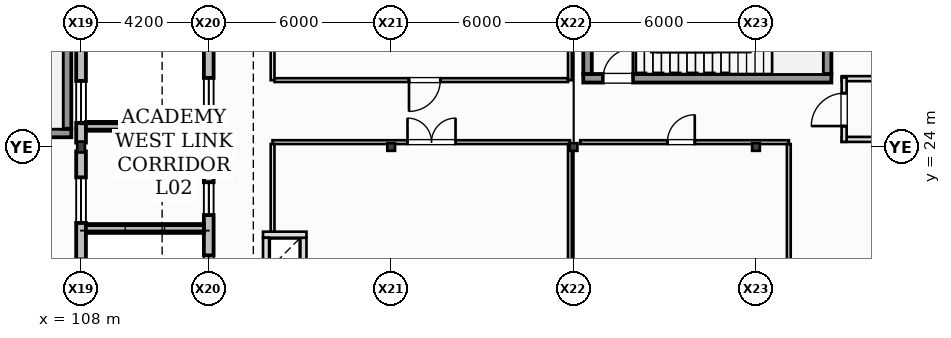
"""IFC4 building model, lengths in metres.
Left out: names, types, materials, properties, quantities, classifications, styles, units other than length and angle.
Written with IfcOpenShell. Run it as: python <this file> out.ifc"""

import sys

from ifc_helpers import new_model, si_unit, direction, frame, frame_2d, origin, origin_2d, place, context, subcontext, project, spatial, rectangle, hollow_rectangle, i_section, extrude, element, fill, save


model = new_model("IFC4")
c1 = context("Model", 3, precision=1e-05, world=origin(), true_north=direction((0.0, 1.0)))
c2 = subcontext(c1, "Body", "Model", "MODEL_VIEW")
j1 = project(units=[si_unit("LENGTHUNIT", "METRE"), si_unit("PLANEANGLEUNIT", "RADIAN")], contexts=[c1])
p1 = place(None, origin())
s1 = spatial("IfcSite", under=j1, at=p1, CompositionType="ELEMENT")
p2 = place(p1, origin())
s2 = spatial("IfcBuilding", under=s1, at=p2, CompositionType="ELEMENT")
p3 = place(p2, frame((0.0, 0.0, 6.0)))
s3 = spatial("IfcBuildingStorey", under=s2, at=p3, CompositionType="ELEMENT", Elevation=6.0)
p4 = place(p3, frame((108.0, 24.0, 0.0), z_axis=(0.0, 0.0, 1.0), x_axis=(1.0, 0.0, 0.0)))
e1 = element("IfcColumn", 1, at=p4, inside=s3, PredefinedType="COLUMN", context=c2, shape_type="SweptSolid", body=[
    extrude(i_section(OverallWidth=0.254, OverallDepth=0.353, WebThickness=0.01, FlangeThickness=0.016, at=origin_2d()), origin(), (0.0, 0.0, 1.0), 4.0),
])
p5 = place(p3, frame((112.2, 24.0, 0.0), z_axis=(0.0, 0.0, 1.0), x_axis=(1.0, 0.0, 0.0)))
e2 = element("IfcColumn", 2, at=p5, inside=s3, PredefinedType="COLUMN", context=c2, shape_type="SweptSolid", body=[
    extrude(hollow_rectangle(XDim=0.25, YDim=0.25, WallThickness=0.012, at=origin_2d()), origin(), (0.0, 0.0, 1.0), 4.0),
])
for number, where, z_axis, x_axis in (
    (3, (118.2, 24.0, 0.0), (0.0, 0.0, 1.0), (1.0, 0.0, 0.0)),
    (4, (124.2, 24.0, 0.0), (0.0, 0.0, 1.0), (1.0, 0.0, 0.0)),
    (5, (130.2, 24.0, 0.0), (0.0, 0.0, 1.0), (1.0, 0.0, 0.0)),
):
    element("IfcColumn", number, at=place(p3, frame(where, z_axis=z_axis, x_axis=x_axis)), inside=s3, PredefinedType="COLUMN", context=c2, shape_type="SweptSolid", body=[
        extrude(i_section(OverallWidth=0.254, OverallDepth=0.253, WebThickness=0.009, FlangeThickness=0.014, at=origin_2d()), origin(), (0.0, 0.0, 1.0), 4.0),
    ])
p6 = place(p3, frame((108.0, 18.145, 0.0), z_axis=(0.0, 0.0, 1.0), x_axis=(0.0, 1.0, 0.0)))
e6 = element("IfcWall", 6, at=p6, inside=s3, PredefinedType="STANDARD", context=c2, shape_type="SweptSolid", body=[
    extrude(rectangle(XDim=5.71, YDim=0.32, at=frame_2d((2.855, 0.0))), origin(), (0.0, 0.0, 1.0), 4.0),
])
p7 = place(p6, frame((0.897, 0.0, 0.86)))
e7 = element("IfcOpeningElement", 7, at=p7, cuts=e6, PredefinedType="OPENING", context=c2, shape_type="SweptSolid", body=[
    extrude(rectangle(XDim=1.26, YDim=1.26, at=frame_2d((0.63, 0.63))), frame((0.0, 0.17, 0.0), z_axis=(0.0, -1.0, 0.0), x_axis=(1.0, 0.0, 0.0)), (0.0, 0.0, 1.0), 0.34),
])
p8 = place(p6, frame((3.357, 0.0, 1.42)))
e8 = element("IfcOpeningElement", 8, at=p8, cuts=e6, PredefinedType="OPENING", context=c2, shape_type="SweptSolid", body=[
    extrude(rectangle(XDim=1.5, YDim=1.5, at=frame_2d((0.75, 0.75))), frame((0.0, 0.17, 0.0), z_axis=(0.0, -1.0, 0.0), x_axis=(1.0, 0.0, 0.0)), (0.0, 0.0, 1.0), 0.34),
])
p9 = place(p3, frame((108.0, 24.145, 0.0), z_axis=(0.0, 0.0, 1.0), x_axis=(0.0, 1.0, 0.0)))
e9 = element("IfcWall", 9, at=p9, inside=s3, PredefinedType="STANDARD", context=c2, shape_type="SweptSolid", body=[
    extrude(rectangle(XDim=5.71, YDim=0.32, at=frame_2d((2.855, 0.0))), origin(), (0.0, 0.0, 1.0), 3.157),
])
p10 = place(p9, frame((0.649, 0.0, 1.18)))
e10 = element("IfcOpeningElement", 10, at=p10, cuts=e9, PredefinedType="OPENING", context=c2, shape_type="SweptSolid", body=[
    extrude(rectangle(XDim=1.38, YDim=1.38, at=frame_2d((0.69, 0.69))), frame((0.0, 0.17, 0.0), z_axis=(0.0, -1.0, 0.0), x_axis=(1.0, 0.0, 0.0)), (0.0, 0.0, 1.0), 0.34),
])
p11 = place(p9, frame((3.933, 0.0, 0.96)))
e11 = element("IfcOpeningElement", 11, at=p11, cuts=e9, PredefinedType="OPENING", context=c2, shape_type="SweptSolid", body=[
    extrude(rectangle(XDim=0.9, YDim=0.9, at=frame_2d((0.45, 0.45))), frame((0.0, 0.17, 0.0), z_axis=(0.0, -1.0, 0.0), x_axis=(1.0, 0.0, 0.0)), (0.0, 0.0, 1.0), 0.34),
])
p12 = place(p3, frame((112.2, 23.855, 0.0), z_axis=(0.0, 0.0, 1.0), x_axis=(0.0, -1.0, 0.0)))
e12 = element("IfcWall", 12, at=p12, inside=s3, PredefinedType="STANDARD", context=c2, shape_type="SweptSolid", body=[
    extrude(rectangle(XDim=5.71, YDim=0.32, at=frame_2d((2.855, 0.0))), origin(), (0.0, 0.0, 1.0), 3.3),
])
p13 = place(p12, frame((1.014, 0.0, 1.28)))
e13 = element("IfcOpeningElement", 13, at=p13, cuts=e12, PredefinedType="OPENING", context=c2, shape_type="SweptSolid", body=[
    extrude(rectangle(XDim=1.08, YDim=1.08, at=frame_2d((0.54, 0.54))), frame((0.0, 0.17, 0.0), z_axis=(0.0, -1.0, 0.0), x_axis=(1.0, 0.0, 0.0)), (0.0, 0.0, 1.0), 0.34),
])
p14 = place(p12, frame((3.42, 0.0, 1.18)))
e14 = element("IfcOpeningElement", 14, at=p14, cuts=e12, PredefinedType="OPENING", context=c2, shape_type="SweptSolid", body=[
    extrude(rectangle(XDim=1.32, YDim=1.32, at=frame_2d((0.66, 0.66))), frame((0.0, 0.17, 0.0), z_axis=(0.0, -1.0, 0.0), x_axis=(1.0, 0.0, 0.0)), (0.0, 0.0, 1.0), 0.34),
])
p15 = place(p3, frame((112.2, 29.855, 0.0), z_axis=(0.0, 0.0, 1.0), x_axis=(0.0, -1.0, 0.0)))
e15 = element("IfcWall", 15, at=p15, inside=s3, PredefinedType="STANDARD", context=c2, shape_type="SweptSolid", body=[
    extrude(rectangle(XDim=5.71, YDim=0.32, at=frame_2d((2.855, 0.0))), origin(), (0.0, 0.0, 1.0), 3.3),
])
p16 = place(p15, frame((0.712, 0.0, 0.86)))
e16 = element("IfcOpeningElement", 16, at=p16, cuts=e15, PredefinedType="OPENING", context=c2, shape_type="SweptSolid", body=[
    extrude(rectangle(XDim=1.2, YDim=1.2, at=frame_2d((0.6, 0.6))), frame((0.0, 0.17, 0.0), z_axis=(0.0, -1.0, 0.0), x_axis=(1.0, 0.0, 0.0)), (0.0, 0.0, 1.0), 0.34),
])
p17 = place(p15, frame((3.582, 0.0, 1.42)))
e17 = element("IfcOpeningElement", 17, at=p17, cuts=e15, PredefinedType="OPENING", context=c2, shape_type="SweptSolid", body=[
    extrude(rectangle(XDim=1.44, YDim=1.44, at=frame_2d((0.72, 0.72))), frame((0.0, 0.17, 0.0), z_axis=(0.0, -1.0, 0.0), x_axis=(1.0, 0.0, 0.0)), (0.0, 0.0, 1.0), 0.34),
])
p18 = place(p3, frame((108.16, 21.32, 0.0), z_axis=(0.0, 0.0, 1.0), x_axis=(1.0, 0.0, 0.0)))
e18 = element("IfcWall", 18, at=p18, inside=s3, PredefinedType="STANDARD", context=c2, shape_type="SweptSolid", body=[
    extrude(rectangle(XDim=3.88, YDim=0.29, at=frame_2d((1.94, 0.0))), origin(), (0.0, 0.0, 1.0), 0.44),
])
p19 = place(p3, frame((112.04, 24.68, 0.0), z_axis=(0.0, 0.0, 1.0), x_axis=(-1.0, 0.0, 0.0)))
e19 = element("IfcWall", 19, at=p19, inside=s3, PredefinedType="STANDARD", context=c2, shape_type="SweptSolid", body=[
    extrude(rectangle(XDim=3.88, YDim=0.29, at=frame_2d((1.94, 0.0))), origin(), (0.0, 0.0, 1.0), 0.56),
])
p20 = place(p3, frame((99.52, 24.46, 0.0), z_axis=(0.0, 0.0, 1.0), x_axis=(1.0, 0.0, 0.0)))
e20 = element("IfcWall", 20, at=p20, inside=s3, PredefinedType="SHEAR", context=c2, shape_type="SweptSolid", body=[
    extrude(rectangle(XDim=8.16, YDim=0.28, at=frame_2d((4.08, 0.0))), origin(), (0.0, 0.0, 1.0), 4.0),
])
p21 = place(p3, frame((107.54, 24.6, 0.0), z_axis=(0.0, 0.0, 1.0), x_axis=(0.0, 1.0, 0.0)))
e21 = element("IfcWall", 21, at=p21, inside=s3, PredefinedType="SHEAR", context=c2, shape_type="SweptSolid", body=[
    extrude(rectangle(XDim=3.0, YDim=0.28, at=frame_2d((1.5, 0.0))), origin(), (0.0, 0.0, 1.0), 4.0),
])
p22 = place(p3, frame((124.52, 26.26, 0.0), z_axis=(0.0, 0.0, 1.0), x_axis=(1.0, 0.0, 0.0)))
e22 = element("IfcWall", 22, at=p22, inside=s3, PredefinedType="SHEAR", context=c2, shape_type="SweptSolid", body=[
    extrude(rectangle(XDim=8.16, YDim=0.28, at=frame_2d((4.08, 0.0))), origin(), (0.0, 0.0, 1.0), 4.0),
])
p23 = place(p22, frame((0.65, 0.0, 0.0)))
e23 = element("IfcOpeningElement", 23, at=p23, cuts=e22, PredefinedType="OPENING", context=c2, shape_type="SweptSolid", body=[
    extrude(rectangle(XDim=0.98, YDim=2.15, at=frame_2d((0.49, 1.075))), frame((0.0, 0.15, 0.0), z_axis=(0.0, -1.0, 0.0), x_axis=(1.0, 0.0, 0.0)), (0.0, 0.0, 1.0), 0.3),
])
for number, where, z_axis, x_axis in (
    (24, (124.66, 29.4, 0.0), (0.0, 0.0, 1.0), (0.0, -1.0, 0.0)),
    (25, (132.54, 26.4, 0.0), (0.0, 0.0, 1.0), (0.0, 1.0, 0.0)),
):
    element("IfcWall", number, at=place(p3, frame(where, z_axis=z_axis, x_axis=x_axis)), inside=s3, PredefinedType="SHEAR", context=c2, shape_type="SweptSolid", body=[
        extrude(rectangle(XDim=3.0, YDim=0.28, at=frame_2d((1.5, 0.0))), origin(), (0.0, 0.0, 1.0), 4.0),
    ])
p24 = place(p3, frame((133.02, 24.25, 0.0), z_axis=(0.0, 0.0, 1.0), x_axis=(1.0, 0.0, 0.0)))
e26 = element("IfcWall", 26, at=p24, inside=s3, PredefinedType="PARTITIONING", context=c2, shape_type="SweptSolid", body=[
    extrude(rectangle(XDim=5.16, YDim=0.165, at=frame_2d((2.58, 0.0))), origin(), (0.0, 0.0, 1.0), 3.153),
])
p25 = place(p24, frame((1.087, 0.0, 0.0)))
e27 = element("IfcOpeningElement", 27, at=p25, cuts=e26, PredefinedType="OPENING", context=c2, shape_type="SweptSolid", body=[
    extrude(rectangle(XDim=1.13, YDim=2.18, at=frame_2d((0.565, 1.09))), frame((0.0, 0.093, 0.0), z_axis=(0.0, -1.0, 0.0), x_axis=(1.0, 0.0, 0.0)), (0.0, 0.0, 1.0), 0.185),
])
p26 = place(p3, frame((133.02, 26.248, 0.0), z_axis=(0.0, 0.0, 1.0), x_axis=(1.0, 0.0, 0.0)))
e28 = element("IfcWall", 28, at=p26, inside=s3, PredefinedType="PARTITIONING", context=c2, shape_type="SweptSolid", body=[
    extrude(rectangle(XDim=1.115, YDim=0.165, at=frame_2d((0.558, 0.0))), origin(), (0.0, 0.0, 1.0), 3.72),
])
p27 = place(p3, frame((133.1, 24.17, 0.0), z_axis=(0.0, 0.0, 1.0), x_axis=(0.0, 1.0, 0.0)))
e29 = element("IfcWall", 29, at=p27, inside=s3, PredefinedType="PARTITIONING", context=c2, shape_type="SweptSolid", body=[
    extrude(rectangle(XDim=2.118, YDim=0.165, at=frame_2d((1.059, 0.0))), origin(), (0.0, 0.0, 1.0), 3.72),
])
p28 = place(p27, frame((0.519, 0.0, 0.0)))
e30 = element("IfcOpeningElement", 30, at=p28, cuts=e29, PredefinedType="OPENING", context=c2, shape_type="SweptSolid", body=[
    extrude(rectangle(XDim=1.08, YDim=2.14, at=frame_2d((0.54, 1.07))), frame((0.0, 0.093, 0.0), z_axis=(0.0, -1.0, 0.0), x_axis=(1.0, 0.0, 0.0)), (0.0, 0.0, 1.0), 0.185),
])
p29 = place(p3, frame((115.315, 19.985, 0.0), z_axis=(0.0, 0.0, 1.0), x_axis=(0.0, 1.0, 0.0)))
e31 = element("IfcWall", 31, at=p29, inside=s3, PredefinedType="PARTITIONING", context=c2, shape_type="SweptSolid", body=[
    extrude(rectangle(XDim=1.03, YDim=0.2, at=frame_2d((0.515, 0.0))), origin(), (0.0, 0.0, 1.0), 3.72),
])
p30 = place(p3, frame((115.415, 21.115, 0.0), z_axis=(0.0, 0.0, 1.0), x_axis=(-1.0, 0.0, 0.0)))
e32 = element("IfcWall", 32, at=p30, inside=s3, PredefinedType="PARTITIONING", context=c2, shape_type="SweptSolid", body=[
    extrude(rectangle(XDim=1.43, YDim=0.2, at=frame_2d((0.715, 0.0))), origin(), (0.0, 0.0, 1.0), 3.72),
])
p31 = place(p3, frame((114.085, 21.015, 0.0), z_axis=(0.0, 0.0, 1.0), x_axis=(0.0, -1.0, 0.0)))
e33 = element("IfcWall", 33, at=p31, inside=s3, PredefinedType="PARTITIONING", context=c2, shape_type="SweptSolid", body=[
    extrude(rectangle(XDim=1.03, YDim=0.2, at=frame_2d((0.515, 0.0))), origin(), (0.0, 0.0, 1.0), 3.72),
])
p32 = place(p3, frame((114.298, 24.16, 0.0), z_axis=(0.0, 0.0, 1.0), x_axis=(1.0, 0.0, 0.0)))
e34 = element("IfcWall", 34, at=p32, inside=s3, PredefinedType="PARTITIONING", context=c2, shape_type="SweptSolid", body=[
    extrude(rectangle(XDim=9.785, YDim=0.125, at=frame_2d((4.893, 0.0))), origin(), (0.0, 0.0, 1.0), 3.72),
])
p33 = place(p32, frame((4.44, 0.0, 0.0)))
e35 = element("IfcOpeningElement", 35, at=p33, cuts=e34, PredefinedType="OPENING", context=c2, shape_type="SweptSolid", body=[
    extrude(rectangle(XDim=1.58, YDim=2.2, at=frame_2d((0.79, 1.1))), frame((0.0, 0.073, 0.0), z_axis=(0.0, -1.0, 0.0), x_axis=(1.0, 0.0, 0.0)), (0.0, 0.0, 1.0), 0.145),
])
p34 = place(p3, frame((124.08, 24.097, 0.0), z_axis=(0.0, 0.0, 1.0), x_axis=(0.0, -1.0, 0.0)))
e36 = element("IfcWall", 36, at=p34, inside=s3, PredefinedType="PARTITIONING", context=c2, shape_type="SweptSolid", body=[
    extrude(rectangle(XDim=5.938, YDim=0.125, at=frame_2d((2.969, 0.0))), origin(), (0.0, 0.0, 1.0), 3.72),
])
p35 = place(p3, frame((114.3, 21.215, 0.0), z_axis=(0.0, 0.0, 1.0), x_axis=(0.0, 1.0, 0.0)))
e37 = element("IfcWall", 37, at=p35, inside=s3, PredefinedType="PARTITIONING", context=c2, shape_type="SweptSolid", body=[
    extrude(rectangle(XDim=2.882, YDim=0.125, at=frame_2d((1.441, 0.0))), origin(), (0.0, 0.0, 1.0), 3.72),
])
for number, where, z_axis, x_axis in (
    (38, (114.3, 26.198, 0.0), (0.0, 0.0, 1.0), (0.0, 1.0, 0.0)),
    (39, (124.08, 29.84, 0.0), (0.0, 0.0, 1.0), (0.0, -1.0, 0.0)),
):
    element("IfcWall", number, at=place(p3, frame(where, z_axis=z_axis, x_axis=x_axis)), inside=s3, PredefinedType="PARTITIONING", context=c2, shape_type="SweptSolid", body=[
        extrude(rectangle(XDim=3.643, YDim=0.125, at=frame_2d((1.821, 0.0))), origin(), (0.0, 0.0, 1.0), 3.72),
    ])
p36 = place(p3, frame((124.018, 26.2, 0.0), z_axis=(0.0, 0.0, 1.0), x_axis=(-1.0, 0.0, 0.0)))
e40 = element("IfcWall", 40, at=p36, inside=s3, PredefinedType="PARTITIONING", context=c2, shape_type="SweptSolid", body=[
    extrude(rectangle(XDim=9.655, YDim=0.125, at=frame_2d((4.828, 0.0))), origin(), (0.0, 0.0, 1.0), 3.72),
])
p37 = place(p36, frame((4.2, 0.0, 0.0)))
e41 = element("IfcOpeningElement", 41, at=p37, cuts=e40, PredefinedType="OPENING", context=c2, shape_type="SweptSolid", body=[
    extrude(rectangle(XDim=1.03, YDim=2.15, at=frame_2d((0.515, 1.075))), frame((0.0, 0.073, 0.0), z_axis=(0.0, -1.0, 0.0), x_axis=(1.0, 0.0, 0.0)), (0.0, 0.0, 1.0), 0.145),
])
p38 = place(p3, frame((124.417, 24.16, 0.0), z_axis=(0.0, 0.0, 1.0), x_axis=(1.0, 0.0, 0.0)))
e42 = element("IfcWall", 42, at=p38, inside=s3, PredefinedType="PARTITIONING", context=c2, shape_type="SweptSolid", body=[
    extrude(rectangle(XDim=6.865, YDim=0.125, at=frame_2d((3.433, 0.0))), origin(), (0.0, 0.0, 1.0), 3.153),
])
p39 = place(p38, frame((2.87, 0.0, 0.0)))
e43 = element("IfcOpeningElement", 43, at=p39, cuts=e42, PredefinedType="OPENING", context=c2, shape_type="SweptSolid", body=[
    extrude(rectangle(XDim=0.9, YDim=2.1, at=frame_2d((0.45, 1.05))), frame((0.0, 0.073, 0.0), z_axis=(0.0, -1.0, 0.0), x_axis=(1.0, 0.0, 0.0)), (0.0, 0.0, 1.0), 0.145),
])
p40 = place(p3, frame((131.28, 24.097, 0.0), z_axis=(0.0, 0.0, 1.0), x_axis=(0.0, -1.0, 0.0)))
e44 = element("IfcWall", 44, at=p40, inside=s3, PredefinedType="PARTITIONING", context=c2, shape_type="SweptSolid", body=[
    extrude(rectangle(XDim=12.155, YDim=0.125, at=frame_2d((6.078, 0.0))), origin(), (0.0, 0.0, 1.0), 3.72),
])
p41 = place(p8, origin())
e45 = element("IfcWindow", 45, at=p41, inside=s3, PartitioningType="SINGLE_PANEL", PredefinedType="WINDOW", context=c2, shape_type="SweptSolid", body=[
    extrude(rectangle(XDim=1.5, YDim=1.5, at=frame_2d((0.75, 0.75))), frame((0.0, 0.03, 0.0), z_axis=(0.0, -1.0, 0.0), x_axis=(1.0, 0.0, 0.0)), (0.0, 0.0, 1.0), 0.06),
])
fill(e8, e45)
p42 = place(p10, origin())
e46 = element("IfcWindow", 46, at=p42, inside=s3, PartitioningType="SINGLE_PANEL", PredefinedType="WINDOW", context=c2, shape_type="SweptSolid", body=[
    extrude(rectangle(XDim=1.38, YDim=1.38, at=frame_2d((0.69, 0.69))), frame((0.0, 0.03, 0.0), z_axis=(0.0, -1.0, 0.0), x_axis=(1.0, 0.0, 0.0)), (0.0, 0.0, 1.0), 0.06),
])
fill(e10, e46)
p43 = place(p13, origin())
e47 = element("IfcWindow", 47, at=p43, inside=s3, PartitioningType="SINGLE_PANEL", PredefinedType="WINDOW", context=c2, shape_type="SweptSolid", body=[
    extrude(rectangle(XDim=1.08, YDim=1.08, at=frame_2d((0.54, 0.54))), frame((0.0, 0.03, 0.0), z_axis=(0.0, -1.0, 0.0), x_axis=(1.0, 0.0, 0.0)), (0.0, 0.0, 1.0), 0.06),
])
fill(e13, e47)
p44 = place(p14, origin())
e48 = element("IfcWindow", 48, at=p44, inside=s3, PartitioningType="SINGLE_PANEL", PredefinedType="WINDOW", context=c2, shape_type="SweptSolid", body=[
    extrude(rectangle(XDim=1.32, YDim=1.32, at=frame_2d((0.66, 0.66))), frame((0.0, 0.03, 0.0), z_axis=(0.0, -1.0, 0.0), x_axis=(1.0, 0.0, 0.0)), (0.0, 0.0, 1.0), 0.06),
])
fill(e14, e48)
p45 = place(p17, origin())
e49 = element("IfcWindow", 49, at=p45, inside=s3, PartitioningType="SINGLE_PANEL", PredefinedType="WINDOW", context=c2, shape_type="SweptSolid", body=[
    extrude(rectangle(XDim=1.44, YDim=1.44, at=frame_2d((0.72, 0.72))), frame((0.0, 0.03, 0.0), z_axis=(0.0, -1.0, 0.0), x_axis=(1.0, 0.0, 0.0)), (0.0, 0.0, 1.0), 0.06),
])
fill(e17, e49)
p46 = place(p23, origin())
e50 = element("IfcDoor", 50, at=p46, inside=s3, OperationType="SINGLE_SWING_RIGHT", PredefinedType="DOOR", context=c2, shape_type="SweptSolid", body=[
    extrude(rectangle(XDim=0.98, YDim=2.15, at=frame_2d((0.49, 1.075))), frame((0.0, 0.025, 0.0), z_axis=(0.0, -1.0, 0.0), x_axis=(1.0, 0.0, 0.0)), (0.0, 0.0, 1.0), 0.05),
])
fill(e23, e50)
p47 = place(p28, frame((1.08, 0.0, 0.0), z_axis=(0.0, 0.0, 1.0), x_axis=(-1.0, 0.0, 0.0)))
e51 = element("IfcDoor", 51, at=p47, inside=s3, OperationType="SINGLE_SWING_LEFT", PredefinedType="DOOR", context=c2, shape_type="SweptSolid", body=[
    extrude(rectangle(XDim=1.08, YDim=2.14, at=frame_2d((0.54, 1.07))), frame((0.0, 0.025, 0.0), z_axis=(0.0, -1.0, 0.0), x_axis=(1.0, 0.0, 0.0)), (0.0, 0.0, 1.0), 0.05),
])
fill(e30, e51)
p48 = place(p33, origin())
e52 = element("IfcDoor", 52, at=p48, inside=s3, OperationType="DOUBLE_DOOR_SINGLE_SWING", PredefinedType="DOOR", context=c2, shape_type="SweptSolid", body=[
    extrude(rectangle(XDim=1.58, YDim=2.2, at=frame_2d((0.79, 1.1))), frame((0.0, 0.025, 0.0), z_axis=(0.0, -1.0, 0.0), x_axis=(1.0, 0.0, 0.0)), (0.0, 0.0, 1.0), 0.05),
])
fill(e35, e52)
p49 = place(p37, frame((1.03, 0.0, 0.0), z_axis=(0.0, 0.0, 1.0), x_axis=(-1.0, 0.0, 0.0)))
e53 = element("IfcDoor", 53, at=p49, inside=s3, OperationType="SINGLE_SWING_RIGHT", PredefinedType="DOOR", context=c2, shape_type="SweptSolid", body=[
    extrude(rectangle(XDim=1.03, YDim=2.15, at=frame_2d((0.515, 1.075))), frame((0.0, 0.025, 0.0), z_axis=(0.0, -1.0, 0.0), x_axis=(1.0, 0.0, 0.0)), (0.0, 0.0, 1.0), 0.05),
])
fill(e41, e53)
p50 = place(p39, frame((0.9, 0.0, 0.0), z_axis=(0.0, 0.0, 1.0), x_axis=(-1.0, 0.0, 0.0)))
e54 = element("IfcDoor", 54, at=p50, inside=s3, OperationType="SINGLE_SWING_RIGHT", PredefinedType="DOOR", context=c2, shape_type="SweptSolid", body=[
    extrude(rectangle(XDim=0.9, YDim=2.1, at=frame_2d((0.45, 1.05))), frame((0.0, 0.025, 0.0), z_axis=(0.0, -1.0, 0.0), x_axis=(1.0, 0.0, 0.0)), (0.0, 0.0, 1.0), 0.05),
])
fill(e43, e54)
save(model, sys.argv[1])
